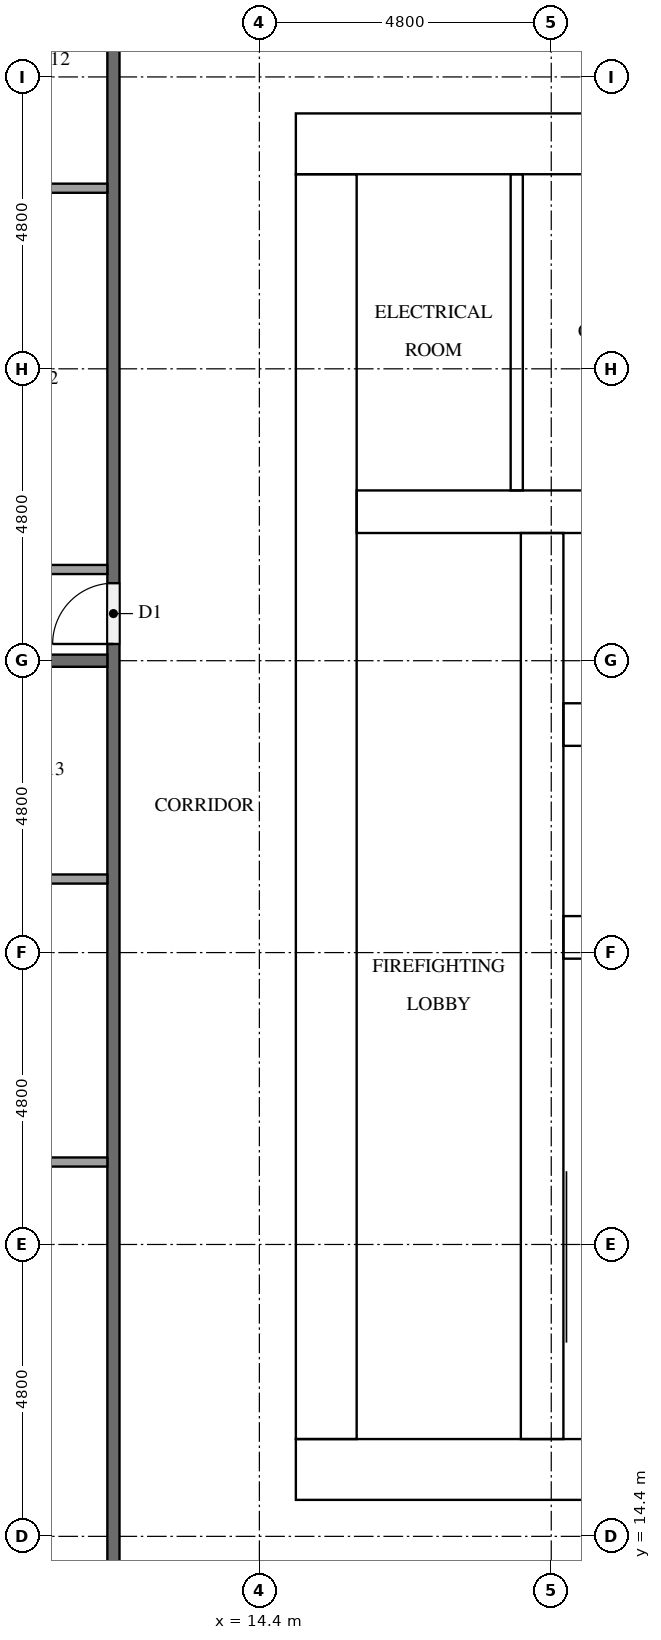
"""IFC4 building model, lengths in metres.
Left out: names, types, materials, properties, quantities, classifications, styles, units other than length and angle.
Written with IfcOpenShell. Run it as: python <this file> out.ifc"""

import sys

from ifc_helpers import new_model, si_unit, direction, frame, frame_2d, origin, place, context, subcontext, project, spatial, rectangle, extrude, element, fill, save


model = new_model("IFC4")
c1 = context("Model", 3, precision=1e-05, world=origin(), true_north=direction((0.0, 1.0)))
c2 = subcontext(c1, "Body", "Model", "MODEL_VIEW")
j1 = project(units=[si_unit("LENGTHUNIT", "METRE"), si_unit("PLANEANGLEUNIT", "RADIAN")], contexts=[c1])
p1 = place(None, origin())
s1 = spatial("IfcSite", under=j1, at=p1, CompositionType="ELEMENT")
p2 = place(p1, origin())
s2 = spatial("IfcBuilding", under=s1, at=p2, CompositionType="ELEMENT")
p3 = place(p2, frame((0.0, 0.0, 36.4)))
s3 = spatial("IfcBuildingStorey", under=s2, at=p3, CompositionType="ELEMENT", Elevation=36.4)
p4 = place(p3, frame((15.0, 15.5, 0.0), z_axis=(0.0, 0.0, 1.0), x_axis=(1.0, 0.0, 0.0)))
e1 = element("IfcWall", 1, at=p4, inside=s3, PredefinedType="SHEAR", context=c2, shape_type="SweptSolid", body=[
    extrude(rectangle(XDim=32.4, YDim=1.0, at=frame_2d((16.2, 0.0))), origin(), (0.0, 0.0, 1.0), 3.2),
])
p5 = place(p4, frame((15.3, 0.0, 0.0)))
e2 = element("IfcOpeningElement", 2, at=p5, cuts=e1, PredefinedType="OPENING", context=c2, shape_type="SweptSolid", body=[
    extrude(rectangle(XDim=1.8, YDim=2.1, at=frame_2d((0.9, 1.05))), frame((0.0, 0.51, 0.0), z_axis=(0.0, -1.0, 0.0), x_axis=(1.0, 0.0, 0.0)), (0.0, 0.0, 1.0), 1.02),
])
p6 = place(p3, frame((15.0, 37.3, 0.0), z_axis=(0.0, 0.0, 1.0), x_axis=(1.0, 0.0, 0.0)))
e3 = element("IfcWall", 3, at=p6, inside=s3, PredefinedType="SHEAR", context=c2, shape_type="SweptSolid", body=[
    extrude(rectangle(XDim=32.4, YDim=1.0, at=frame_2d((16.2, 0.0))), origin(), (0.0, 0.0, 1.0), 3.2),
])
p7 = place(p6, frame((15.3, 0.0, 0.0)))
e4 = element("IfcOpeningElement", 4, at=p7, cuts=e3, PredefinedType="OPENING", context=c2, shape_type="SweptSolid", body=[
    extrude(rectangle(XDim=1.8, YDim=2.1, at=frame_2d((0.9, 1.05))), frame((0.0, 0.51, 0.0), z_axis=(0.0, -1.0, 0.0), x_axis=(1.0, 0.0, 0.0)), (0.0, 0.0, 1.0), 1.02),
])
p8 = place(p6, frame((1.766, 0.0, 0.0)))
e5 = element("IfcOpeningElement", 5, at=p8, cuts=e3, PredefinedType="OPENING", context=c2, shape_type="SweptSolid", body=[
    extrude(rectangle(XDim=1.0, YDim=2.1, at=frame_2d((0.5, 1.05))), frame((0.0, 0.51, 0.0), z_axis=(0.0, -1.0, 0.0), x_axis=(1.0, 0.0, 0.0)), (0.0, 0.0, 1.0), 1.02),
])
p9 = place(p6, frame((5.241, 0.0, 0.0)))
e6 = element("IfcOpeningElement", 6, at=p9, cuts=e3, PredefinedType="OPENING", context=c2, shape_type="SweptSolid", body=[
    extrude(rectangle(XDim=1.0, YDim=2.1, at=frame_2d((0.5, 1.05))), frame((0.0, 0.51, 0.0), z_axis=(0.0, -1.0, 0.0), x_axis=(1.0, 0.0, 0.0)), (0.0, 0.0, 1.0), 1.02),
])
p10 = place(p3, frame((15.5, 16.0, 0.0), z_axis=(0.0, 0.0, 1.0), x_axis=(0.0, 1.0, 0.0)))
e7 = element("IfcWall", 7, at=p10, inside=s3, PredefinedType="SHEAR", context=c2, shape_type="SweptSolid", body=[
    extrude(rectangle(XDim=20.8, YDim=1.0, at=frame_2d((10.4, 0.0))), origin(), (0.0, 0.0, 1.0), 3.2),
])
p11 = place(p10, frame((4.76, 0.0, 0.0)))
e8 = element("IfcOpeningElement", 8, at=p11, cuts=e7, PredefinedType="OPENING", context=c2, shape_type="SweptSolid", body=[
    extrude(rectangle(XDim=1.2, YDim=2.1, at=frame_2d((0.6, 1.05))), frame((0.0, 0.51, 0.0), z_axis=(0.0, -1.0, 0.0), x_axis=(1.0, 0.0, 0.0)), (0.0, 0.0, 1.0), 1.02),
])
p12 = place(p3, frame((19.05, 16.0, 0.0), z_axis=(0.0, 0.0, 1.0), x_axis=(0.0, 1.0, 0.0)))
e9 = element("IfcWall", 9, at=p12, inside=s3, PredefinedType="SHEAR", context=c2, shape_type="SweptSolid", body=[
    extrude(rectangle(XDim=14.9, YDim=0.7, at=frame_2d((7.45, 0.0))), origin(), (0.0, 0.0, 1.0), 3.2),
])
p13 = place(p12, frame((9.45, 0.0, 0.0)))
e10 = element("IfcOpeningElement", 10, at=p13, cuts=e9, PredefinedType="OPENING", context=c2, shape_type="SweptSolid", body=[
    extrude(rectangle(XDim=1.1, YDim=2.1, at=frame_2d((0.55, 1.05))), frame((0.0, 0.36, 0.0), z_axis=(0.0, -1.0, 0.0), x_axis=(1.0, 0.0, 0.0)), (0.0, 0.0, 1.0), 0.72),
])
p14 = place(p12, frame((12.95, 0.0, 0.0)))
e11 = element("IfcOpeningElement", 11, at=p14, cuts=e9, PredefinedType="OPENING", context=c2, shape_type="SweptSolid", body=[
    extrude(rectangle(XDim=1.1, YDim=2.1, at=frame_2d((0.55, 1.05))), frame((0.0, 0.36, 0.0), z_axis=(0.0, -1.0, 0.0), x_axis=(1.0, 0.0, 0.0)), (0.0, 0.0, 1.0), 0.72),
])
p15 = place(p12, frame((0.2, 0.0, 0.0)))
e12 = element("IfcOpeningElement", 12, at=p15, cuts=e9, PredefinedType="OPENING", context=c2, shape_type="SweptSolid", body=[
    extrude(rectangle(XDim=1.2, YDim=2.1, at=frame_2d((0.6, 1.05))), frame((0.0, 0.36, 0.0), z_axis=(0.0, -1.0, 0.0), x_axis=(1.0, 0.0, 0.0)), (0.0, 0.0, 1.0), 0.72),
])
for number, where, z_axis, x_axis in (
    (13, (19.4, 24.25, 0.0), (0.0, 0.0, 1.0), (1.0, 0.0, 0.0)),
    (14, (19.4, 27.75, 0.0), (0.0, 0.0, 1.0), (1.0, 0.0, 0.0)),
):
    element("IfcWall", number, at=place(p3, frame(where, z_axis=z_axis, x_axis=x_axis)), inside=s3, PredefinedType="SHEAR", context=c2, shape_type="SweptSolid", body=[
        extrude(rectangle(XDim=3.35, YDim=0.7, at=frame_2d((1.675, 0.0))), origin(), (0.0, 0.0, 1.0), 3.2),
    ])
p16 = place(p3, frame((16.0, 31.25, 0.0), z_axis=(0.0, 0.0, 1.0), x_axis=(1.0, 0.0, 0.0)))
e15 = element("IfcWall", 15, at=p16, inside=s3, PredefinedType="SHEAR", context=c2, shape_type="SweptSolid", body=[
    extrude(rectangle(XDim=6.75, YDim=0.7, at=frame_2d((3.375, 0.0))), origin(), (0.0, 0.0, 1.0), 3.2),
])
p17 = place(p3, frame((18.633, 31.6, 0.0), z_axis=(0.0, 0.0, 1.0), x_axis=(0.0, 1.0, 0.0)))
e16 = element("IfcWall", 16, at=p17, inside=s3, PredefinedType="PARTITIONING", context=c2, shape_type="SweptSolid", body=[
    extrude(rectangle(XDim=5.2, YDim=0.2, at=frame_2d((2.6, 0.0))), origin(), (0.0, 0.0, 1.0), 3.2),
])
p18 = place(p3, frame((12.0, 12.1, 0.0), z_axis=(0.0, 0.0, 1.0), x_axis=(0.0, 1.0, 0.0)))
e17 = element("IfcWall", 17, at=p18, inside=s3, PredefinedType="PARTITIONING", context=c2, shape_type="SweptSolid", body=[
    extrude(rectangle(XDim=28.6, YDim=0.2, at=frame_2d((14.3, 0.0))), origin(), (0.0, 0.0, 1.0), 3.2),
])
p19 = place(p18, frame((16.975, 0.0, 0.0)))
e18 = element("IfcOpeningElement", 18, at=p19, cuts=e17, PredefinedType="OPENING", context=c2, shape_type="SweptSolid", body=[
    extrude(rectangle(XDim=1.0, YDim=2.1, at=frame_2d((0.5, 1.05))), frame((0.0, 0.11, 0.0), z_axis=(0.0, -1.0, 0.0), x_axis=(1.0, 0.0, 0.0)), (0.0, 0.0, 1.0), 0.22),
])
p20 = place(p18, frame((0.175, 0.0, 0.0)))
e19 = element("IfcOpeningElement", 19, at=p20, cuts=e17, PredefinedType="OPENING", context=c2, shape_type="SweptSolid", body=[
    extrude(rectangle(XDim=1.0, YDim=2.1, at=frame_2d((0.5, 1.05))), frame((0.0, 0.11, 0.0), z_axis=(0.0, -1.0, 0.0), x_axis=(1.0, 0.0, 0.0)), (0.0, 0.0, 1.0), 0.22),
])
p21 = place(p3, frame((0.1, 28.8, 0.0), z_axis=(0.0, 0.0, 1.0), x_axis=(1.0, 0.0, 0.0)))
e20 = element("IfcWall", 20, at=p21, inside=s3, PredefinedType="PARTITIONING", context=c2, shape_type="SweptSolid", body=[
    extrude(rectangle(XDim=11.8, YDim=0.2, at=frame_2d((5.9, 0.0))), origin(), (0.0, 0.0, 1.0), 3.2),
])
p22 = place(p3, frame((11.9, 36.57, 0.0), z_axis=(0.0, 0.0, 1.0), x_axis=(-1.0, 0.0, 0.0)))
e21 = element("IfcWall", 21, at=p22, inside=s3, PredefinedType="PARTITIONING", context=c2, shape_type="SweptSolid", body=[
    extrude(rectangle(XDim=3.725, YDim=0.15, at=frame_2d((1.862, 0.0))), origin(), (0.0, 0.0, 1.0), 3.2),
])
p23 = place(p3, frame((11.9, 30.3, 0.0), z_axis=(0.0, 0.0, 1.0), x_axis=(-1.0, 0.0, 0.0)))
e22 = element("IfcWall", 22, at=p23, inside=s3, PredefinedType="PARTITIONING", context=c2, shape_type="SweptSolid", body=[
    extrude(rectangle(XDim=3.875, YDim=0.15, at=frame_2d((1.938, 0.0))), origin(), (0.0, 0.0, 1.0), 3.2),
])
for number, where, z_axis, x_axis in (
    (23, (11.9, 20.556, 0.0), (0.0, 0.0, 1.0), (-1.0, 0.0, 0.0)),
    (24, (11.9, 25.21, 0.0), (0.0, 0.0, 1.0), (-1.0, 0.0, 0.0)),
):
    element("IfcWall", number, at=place(p3, frame(where, z_axis=z_axis, x_axis=x_axis)), inside=s3, PredefinedType="PARTITIONING", context=c2, shape_type="SweptSolid", body=[
        extrude(rectangle(XDim=4.475, YDim=0.15, at=frame_2d((2.237, 0.0))), origin(), (0.0, 0.0, 1.0), 3.2),
    ])
p24 = place(p13, origin())
e25 = element("IfcDoor", 25, at=p24, inside=s3, OperationType="DOUBLE_DOOR_SLIDING", PredefinedType="DOOR", context=c2, shape_type="SweptSolid", body=[
    extrude(rectangle(XDim=1.1, YDim=2.1, at=frame_2d((0.55, 1.05))), frame((0.0, 0.025, 0.0), z_axis=(0.0, -1.0, 0.0), x_axis=(1.0, 0.0, 0.0)), (0.0, 0.0, 1.0), 0.05),
])
fill(e10, e25)
p25 = place(p14, origin())
e26 = element("IfcDoor", 26, at=p25, inside=s3, OperationType="DOUBLE_DOOR_SLIDING", PredefinedType="DOOR", context=c2, shape_type="SweptSolid", body=[
    extrude(rectangle(XDim=1.1, YDim=2.1, at=frame_2d((0.55, 1.05))), frame((0.0, 0.025, 0.0), z_axis=(0.0, -1.0, 0.0), x_axis=(1.0, 0.0, 0.0)), (0.0, 0.0, 1.0), 0.05),
])
fill(e11, e26)
p26 = place(p15, frame((1.2, 0.0, 0.0), z_axis=(0.0, 0.0, 1.0), x_axis=(-1.0, 0.0, 0.0)))
e27 = element("IfcDoor", 27, at=p26, inside=s3, OperationType="SINGLE_SWING_RIGHT", PredefinedType="DOOR", context=c2, shape_type="SweptSolid", body=[
    extrude(rectangle(XDim=1.2, YDim=2.1, at=frame_2d((0.6, 1.05))), frame((0.0, 0.025, 0.0), z_axis=(0.0, -1.0, 0.0), x_axis=(1.0, 0.0, 0.0)), (0.0, 0.0, 1.0), 0.05),
])
fill(e12, e27)
p27 = place(p11, frame((1.2, 0.0, 0.0), z_axis=(0.0, 0.0, 1.0), x_axis=(-1.0, 0.0, 0.0)))
e28 = element("IfcDoor", 28, at=p27, inside=s3, OperationType="SINGLE_SWING_LEFT", PredefinedType="DOOR", context=c2, shape_type="SweptSolid", body=[
    extrude(rectangle(XDim=1.2, YDim=2.1, at=frame_2d((0.6, 1.05))), frame((0.0, 0.025, 0.0), z_axis=(0.0, -1.0, 0.0), x_axis=(1.0, 0.0, 0.0)), (0.0, 0.0, 1.0), 0.05),
])
fill(e8, e28)
p28 = place(p8, origin())
e29 = element("IfcDoor", 29, at=p28, inside=s3, OperationType="SINGLE_SWING_LEFT", PredefinedType="DOOR", context=c2, shape_type="SweptSolid", body=[
    extrude(rectangle(XDim=1.0, YDim=2.1, at=frame_2d((0.5, 1.05))), frame((0.0, 0.025, 0.0), z_axis=(0.0, -1.0, 0.0), x_axis=(1.0, 0.0, 0.0)), (0.0, 0.0, 1.0), 0.05),
])
fill(e5, e29)
p29 = place(p19, origin())
e30 = element("IfcDoor", 30, at=p29, inside=s3, OperationType="SINGLE_SWING_LEFT", PredefinedType="DOOR", context=c2, shape_type="SweptSolid", body=[
    extrude(rectangle(XDim=1.0, YDim=2.1, at=frame_2d((0.5, 1.05))), frame((0.0, 0.025, 0.0), z_axis=(0.0, -1.0, 0.0), x_axis=(1.0, 0.0, 0.0)), (0.0, 0.0, 1.0), 0.05),
])
fill(e18, e30)
save(model, sys.argv[1])
